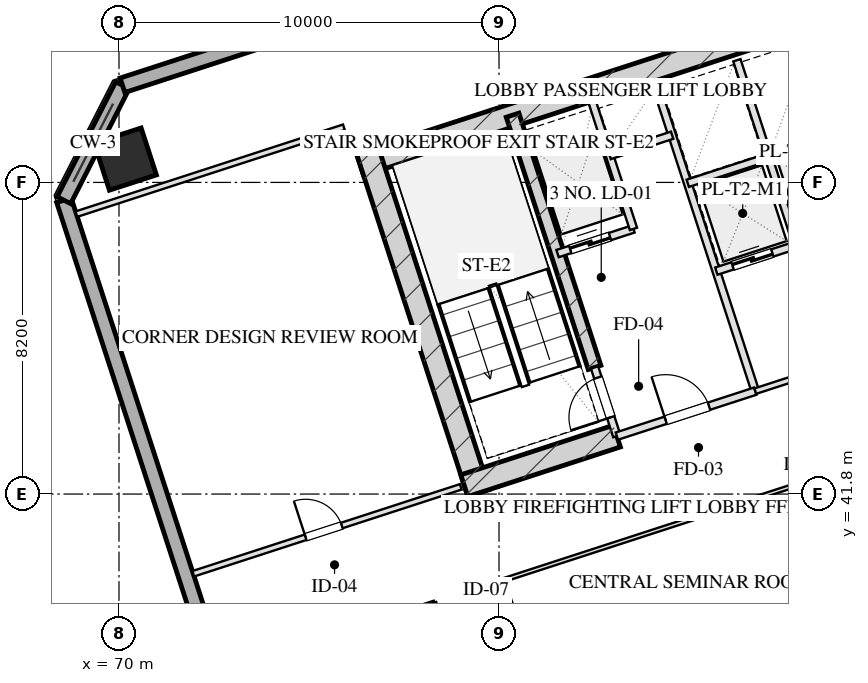
"""IFC4 building model, lengths in metres.
Left out: names, types, materials, properties, quantities, classifications, styles, units other than length and angle.
Written with IfcOpenShell. Run it as: python <this file> out.ifc"""

import sys

from ifc_helpers import new_model, si_unit, direction, frame, frame_2d, origin, origin_2d, place, context, subcontext, project, spatial, rectangle, hollow_rectangle, extrude, element, fill, save


model = new_model("IFC4")
c1 = context("Model", 3, precision=1e-05, world=origin(), true_north=direction((0.0, 1.0)))
c2 = subcontext(c1, "Body", "Model", "MODEL_VIEW")
j1 = project(units=[si_unit("LENGTHUNIT", "METRE"), si_unit("PLANEANGLEUNIT", "RADIAN")], contexts=[c1])
p1 = place(None, origin())
s1 = spatial("IfcSite", under=j1, at=p1, CompositionType="ELEMENT")
p2 = place(p1, origin())
s2 = spatial("IfcBuilding", under=s1, at=p2, CompositionType="ELEMENT")
p3 = place(p2, frame((0.0, 0.0, 146.05)))
s3 = spatial("IfcBuildingStorey", under=s2, at=p3, CompositionType="ELEMENT", Elevation=146.05)
p4 = place(p3, frame((76.344, 50.466, 0.0), z_axis=(0.0, 0.0, 1.0), x_axis=(0.951055727519, 0.309019421968, 0.0)))
e1 = element("IfcWall", 1, at=p4, inside=s3, PredefinedType="SHEAR", context=c2, shape_type="SweptSolid", body=[
    extrude(rectangle(XDim=16.4, YDim=0.6, at=frame_2d((8.2, 0.0))), origin(), (0.0, 0.0, 1.0), 3.45),
])
p5 = place(p3, frame((79.466, 41.828, 0.0), z_axis=(0.0, 0.0, 1.0), x_axis=(-0.309041232772, 0.951048640421, 0.0)))
e2 = element("IfcWall", 2, at=p5, inside=s3, PredefinedType="SHEAR", context=c2, shape_type="SweptSolid", body=[
    extrude(rectangle(XDim=9.48, YDim=0.6, at=frame_2d((4.74, 0.0))), origin(), (0.0, 0.0, 1.0), 3.45),
])
p6 = place(p3, frame((82.514, 45.131, 0.0), z_axis=(0.0, 0.0, 1.0), x_axis=(-0.308988790936, 0.951065679686, 0.0)))
e3 = element("IfcWall", 3, at=p6, inside=s3, PredefinedType="SHEAR", context=c2, shape_type="SweptSolid", body=[
    extrude(rectangle(XDim=6.98, YDim=0.35, at=frame_2d((3.49, 0.0))), origin(), (0.0, 0.0, 1.0), 3.45),
])
p7 = place(p3, frame((79.087, 42.021, 0.0), z_axis=(0.0, 0.0, 1.0), x_axis=(0.951062550203, 0.3089984233, 0.0)))
e4 = element("IfcWall", 4, at=p7, inside=s3, PredefinedType="SHEAR", context=c2, shape_type="SweptSolid", body=[
    extrude(rectangle(XDim=4.22, YDim=0.6, at=frame_2d((2.11, 0.0))), origin(), (0.0, 0.0, 1.0), 3.45),
])
p8 = place(p3, frame((70.165, 50.614, 0.0), z_axis=(0.0, 0.0, 1.0), x_axis=(0.951056516295, 0.309016994375, 0.0)))
e5 = element("IfcColumn", 5, at=p8, inside=s3, PredefinedType="COLUMN", context=c2, shape_type="SweptSolid", body=[
    extrude(hollow_rectangle(XDim=1.3, YDim=1.3, WallThickness=0.045, at=origin_2d()), origin(), (0.0, 0.0, 1.0), 3.451),
])
p9 = place(p3, frame((81.776, 8.827, 0.0), z_axis=(0.0, 0.0, 1.0), x_axis=(-0.309014228706, 0.951057414911, 0.0)))
e6 = element("IfcWall", 6, at=p9, inside=s3, PredefinedType="SOLIDWALL", context=c2, shape_type="SweptSolid", body=[
    extrude(rectangle(XDim=42.8, YDim=0.4, at=frame_2d((21.4, 0.0))), origin(), (0.0, 0.0, 1.0), 2.61),
])
p10 = place(p9, frame((17.733, 0.0, 0.0)))
e7 = element("IfcOpeningElement", 7, at=p10, cuts=e6, PredefinedType="OPENING", context=c2, shape_type="SweptSolid", body=[
    extrude(rectangle(XDim=1.1, YDim=2.15, at=frame_2d((0.55, 1.075))), frame((0.0, 0.21, 0.0), z_axis=(0.0, -1.0, 0.0), x_axis=(1.0, 0.0, 0.0)), (0.0, 0.0, 1.0), 0.42),
])
p11 = place(p3, frame((68.551, 49.532, 0.0), z_axis=(0.0, 0.0, 1.0), x_axis=(0.454019523198, 0.890991735402, 0.0)))
e8 = element("IfcWall", 8, at=p11, inside=s3, PredefinedType="SOLIDWALL", context=c2, shape_type="SweptSolid", body=[
    extrude(rectangle(XDim=3.394, YDim=0.4, at=frame_2d((1.697, 0.0))), origin(), (0.0, 0.0, 1.0), 2.61),
])
p12 = place(p3, frame((70.092, 52.556, 0.0), z_axis=(0.0, 0.0, 1.0), x_axis=(0.951057580055, 0.30901372044, 0.0)))
e9 = element("IfcWall", 9, at=p12, inside=s3, PredefinedType="SOLIDWALL", context=c2, shape_type="SweptSolid", body=[
    extrude(rectangle(XDim=26.4, YDim=0.4, at=frame_2d((13.2, 0.0))), origin(), (0.0, 0.0, 1.0), 2.61),
])
p13 = place(p3, frame((83.101, 43.324, 0.0), z_axis=(0.0, 0.0, 1.0), x_axis=(-0.309048298632, 0.951046344356, 0.0)))
e10 = element("IfcWall", 10, at=p13, inside=s3, PredefinedType="PARTITIONING", context=c2, shape_type="SweptSolid", body=[
    extrude(rectangle(XDim=1.9, YDim=0.2, at=frame_2d((0.95, 0.0))), origin(), (0.0, 0.0, 1.0), 3.175),
])
p14 = place(p13, frame((0.52, 0.0, 0.0)))
e11 = element("IfcOpeningElement", 11, at=p14, cuts=e10, PredefinedType="OPENING", context=c2, shape_type="SweptSolid", body=[
    extrude(rectangle(XDim=1.1, YDim=2.05, at=frame_2d((0.55, 1.025))), frame((0.0, 0.11, 0.0), z_axis=(0.0, -1.0, 0.0), x_axis=(1.0, 0.0, 0.0)), (0.0, 0.0, 1.0), 0.22),
])
p15 = place(p3, frame((86.743, 44.508, 0.0), z_axis=(0.0, 0.0, 1.0), x_axis=(-0.309016001439, 0.951056838919, 0.0)))
e12 = element("IfcWall", 12, at=p15, inside=s3, PredefinedType="PARTITIONING", context=c2, shape_type="SweptSolid", body=[
    extrude(rectangle(XDim=8.43, YDim=0.2, at=frame_2d((4.215, 0.0))), origin(), (0.0, 0.0, 1.0), 3.175),
])
p16 = place(p3, frame((83.101, 43.324, 0.0), z_axis=(0.0, 0.0, 1.0), x_axis=(0.951052804469, 0.309028417967, 0.0)))
e13 = element("IfcWall", 13, at=p16, inside=s3, PredefinedType="PARTITIONING", context=c2, shape_type="SweptSolid", body=[
    extrude(rectangle(XDim=3.83, YDim=0.2, at=frame_2d((1.915, 0.0))), origin(), (0.0, 0.0, 1.0), 3.175),
])
p17 = place(p16, frame((1.35, 0.0, 0.0)))
e14 = element("IfcOpeningElement", 14, at=p17, cuts=e13, PredefinedType="OPENING", context=c2, shape_type="SweptSolid", body=[
    extrude(rectangle(XDim=1.2, YDim=2.05, at=frame_2d((0.6, 1.025))), frame((0.0, 0.11, 0.0), z_axis=(0.0, -1.0, 0.0), x_axis=(1.0, 0.0, 0.0)), (0.0, 0.0, 1.0), 0.22),
])
p18 = place(p3, frame((81.54, 48.127, 0.0), z_axis=(0.0, 0.0, 1.0), x_axis=(0.951062257173, 0.308999325213, 0.0)))
e15 = element("IfcWall", 15, at=p18, inside=s3, PredefinedType="PARTITIONING", context=c2, shape_type="SweptSolid", body=[
    extrude(rectangle(XDim=2.1, YDim=0.2, at=frame_2d((1.05, 0.0))), origin(), (0.0, 0.0, 1.0), 3.175),
])
p19 = place(p18, frame((0.35, 0.0, 0.0)))
e16 = element("IfcOpeningElement", 16, at=p19, cuts=e15, PredefinedType="OPENING", context=c2, shape_type="SweptSolid", body=[
    extrude(rectangle(XDim=1.1, YDim=2.05, at=frame_2d((0.55, 1.025))), frame((0.0, 0.11, 0.0), z_axis=(0.0, -1.0, 0.0), x_axis=(1.0, 0.0, 0.0)), (0.0, 0.0, 1.0), 0.22),
])
p20 = place(p3, frame((83.538, 48.776, 0.0), z_axis=(0.0, 0.0, 1.0), x_axis=(-0.3089935693, 0.951064127245, 0.0)))
e17 = element("IfcWall", 17, at=p20, inside=s3, PredefinedType="PARTITIONING", context=c2, shape_type="SweptSolid", body=[
    extrude(rectangle(XDim=3.7, YDim=0.2, at=frame_2d((1.85, 0.0))), origin(), (0.0, 0.0, 1.0), 3.175),
])
p21 = place(p3, frame((82.91, 50.707, 0.0), z_axis=(0.0, 0.0, 1.0), x_axis=(0.951041328149, 0.309063734775, 0.0)))
e18 = element("IfcWall", 18, at=p21, inside=s3, PredefinedType="PARTITIONING", context=c2, shape_type="SweptSolid", body=[
    extrude(rectangle(XDim=1.73, YDim=0.2, at=frame_2d((0.865, 0.0))), origin(), (0.0, 0.0, 1.0), 3.175),
])
p22 = place(p3, frame((86.743, 44.508, 0.0), z_axis=(0.0, 0.0, 1.0), x_axis=(0.951063829732, 0.308994485023, 0.0)))
e19 = element("IfcWall", 19, at=p22, inside=s3, PredefinedType="PARTITIONING", context=c2, shape_type="SweptSolid", body=[
    extrude(rectangle(XDim=4.4, YDim=0.15, at=frame_2d((2.2, 0.0))), origin(), (0.0, 0.0, 1.0), 3.175),
])
p23 = place(p22, frame((1.45, 0.0, 0.0)))
e20 = element("IfcOpeningElement", 20, at=p23, cuts=e19, PredefinedType="OPENING", context=c2, shape_type="SweptSolid", body=[
    extrude(rectangle(XDim=1.5, YDim=2.05, at=frame_2d((0.75, 1.025))), frame((0.0, 0.085, 0.0), z_axis=(0.0, -1.0, 0.0), x_axis=(1.0, 0.0, 0.0)), (0.0, 0.0, 1.0), 0.17),
])
p24 = place(p3, frame((85.718, 47.666, 0.0), z_axis=(0.0, 0.0, 1.0), x_axis=(0.951058531764, 0.30901079133, 0.0)))
e21 = element("IfcWall", 21, at=p24, inside=s3, PredefinedType="PARTITIONING", context=c2, shape_type="SweptSolid", body=[
    extrude(rectangle(XDim=4.4, YDim=0.2, at=frame_2d((2.2, 0.0))), origin(), (0.0, 0.0, 1.0), 3.175),
])
p25 = place(p24, frame((0.45, 0.0, 0.0)))
e22 = element("IfcOpeningElement", 22, at=p25, cuts=e21, PredefinedType="OPENING", context=c2, shape_type="SweptSolid", body=[
    extrude(rectangle(XDim=1.1, YDim=2.05, at=frame_2d((0.55, 1.025))), frame((0.0, 0.11, 0.0), z_axis=(0.0, -1.0, 0.0), x_axis=(1.0, 0.0, 0.0)), (0.0, 0.0, 1.0), 0.22),
])
p26 = place(p24, frame((2.55, 0.0, 0.0)))
e23 = element("IfcOpeningElement", 23, at=p26, cuts=e21, PredefinedType="OPENING", context=c2, shape_type="SweptSolid", body=[
    extrude(rectangle(XDim=1.1, YDim=2.05, at=frame_2d((0.55, 1.025))), frame((0.0, 0.11, 0.0), z_axis=(0.0, -1.0, 0.0), x_axis=(1.0, 0.0, 0.0)), (0.0, 0.0, 1.0), 0.22),
])
p27 = place(p3, frame((87.838, 48.354, 0.0), z_axis=(0.0, 0.0, 1.0), x_axis=(-0.3090093719, 0.951058992953, 0.0)))
e24 = element("IfcWall", 24, at=p27, inside=s3, PredefinedType="PARTITIONING", context=c2, shape_type="SweptSolid", body=[
    extrude(rectangle(XDim=5.11, YDim=0.2, at=frame_2d((2.555, 0.0))), origin(), (0.0, 0.0, 1.0), 3.175),
])
p28 = place(p3, frame((84.967, 49.977, 0.0), z_axis=(0.0, 0.0, 1.0), x_axis=(0.951063829732, 0.308994485023, 0.0)))
e25 = element("IfcWall", 25, at=p28, inside=s3, PredefinedType="PARTITIONING", context=c2, shape_type="SweptSolid", body=[
    extrude(rectangle(XDim=4.4, YDim=0.2, at=frame_2d((2.2, 0.0))), origin(), (0.0, 0.0, 1.0), 3.175),
])
p29 = place(p3, frame((68.88, 49.166, 0.0), z_axis=(0.0, 0.0, 1.0), x_axis=(0.951060977215, 0.309003264738, 0.0)))
e26 = element("IfcWall", 26, at=p29, inside=s3, PredefinedType="PARTITIONING", context=c2, shape_type="SweptSolid", body=[
    extrude(rectangle(XDim=7.4, YDim=0.15, at=frame_2d((3.7, 0.0))), origin(), (0.0, 0.0, 1.0), 3.175),
])
p30 = place(p3, frame((71.955, 39.703, 0.0), z_axis=(0.0, 0.0, 1.0), x_axis=(0.951060977215, 0.309003264738, 0.0)))
e27 = element("IfcWall", 27, at=p30, inside=s3, PredefinedType="PARTITIONING", context=c2, shape_type="SweptSolid", body=[
    extrude(rectangle(XDim=7.4, YDim=0.15, at=frame_2d((3.7, 0.0))), origin(), (0.0, 0.0, 1.0), 3.175),
])
p31 = place(p30, frame((3.108, 0.0, 0.0)))
e28 = element("IfcOpeningElement", 28, at=p31, cuts=e27, PredefinedType="OPENING", context=c2, shape_type="SweptSolid", body=[
    extrude(rectangle(XDim=1.0, YDim=2.05, at=frame_2d((0.5, 1.025))), frame((0.0, 0.085, 0.0), z_axis=(0.0, -1.0, 0.0), x_axis=(1.0, 0.0, 0.0)), (0.0, 0.0, 1.0), 0.17),
])
p32 = place(p3, frame((72.783, 37.154, 0.0), z_axis=(0.0, 0.0, 1.0), x_axis=(0.951047059821, 0.309046096893, 0.0)))
e29 = element("IfcWall", 29, at=p32, inside=s3, PredefinedType="MOVABLE", context=c2, shape_type="SweptSolid", body=[
    extrude(rectangle(XDim=5.8, YDim=0.1, at=frame_2d((2.9, 0.0))), origin(), (0.0, 0.0, 1.0), 3.175),
])
p33 = place(p3, frame((80.106, 39.533, 0.0), z_axis=(0.0, 0.0, 1.0), x_axis=(0.951059123431, 0.309008970321, 0.0)))
e30 = element("IfcWall", 30, at=p33, inside=s3, PredefinedType="MOVABLE", context=c2, shape_type="SweptSolid", body=[
    extrude(rectangle(XDim=8.95, YDim=0.1, at=frame_2d((4.475, 0.0))), origin(), (0.0, 0.0, 1.0), 3.175),
])
p34 = place(p3, frame((83.441, 23.121, 0.0), z_axis=(0.0, 0.0, 1.0), x_axis=(-0.30901773025, 0.951056277195, 0.0)))
e31 = element("IfcWall", 31, at=p34, inside=s3, PredefinedType="MOVABLE", context=c2, shape_type="SweptSolid", body=[
    extrude(rectangle(XDim=16.64, YDim=0.1, at=frame_2d((8.32, 0.0))), origin(), (0.0, 0.0, 1.0), 3.175),
])
p35 = place(p34, frame((1.143, 0.0, 0.0)))
e32 = element("IfcOpeningElement", 32, at=p35, cuts=e31, PredefinedType="OPENING", context=c2, shape_type="SweptSolid", body=[
    extrude(rectangle(XDim=1.0, YDim=2.05, at=frame_2d((0.5, 1.025))), frame((0.0, 0.06, 0.0), z_axis=(0.0, -1.0, 0.0), x_axis=(1.0, 0.0, 0.0)), (0.0, 0.0, 1.0), 0.12),
])
p36 = place(p34, frame((4.703, 0.0, 0.0)))
e33 = element("IfcOpeningElement", 33, at=p36, cuts=e31, PredefinedType="OPENING", context=c2, shape_type="SweptSolid", body=[
    extrude(rectangle(XDim=1.0, YDim=2.05, at=frame_2d((0.5, 1.025))), frame((0.0, 0.06, 0.0), z_axis=(0.0, -1.0, 0.0), x_axis=(1.0, 0.0, 0.0)), (0.0, 0.0, 1.0), 0.12),
])
p37 = place(p34, frame((7.82, 0.0, 0.0)))
e34 = element("IfcOpeningElement", 34, at=p37, cuts=e31, PredefinedType="OPENING", context=c2, shape_type="SweptSolid", body=[
    extrude(rectangle(XDim=1.0, YDim=2.05, at=frame_2d((0.5, 1.025))), frame((0.0, 0.06, 0.0), z_axis=(0.0, -1.0, 0.0), x_axis=(1.0, 0.0, 0.0)), (0.0, 0.0, 1.0), 0.12),
])
p38 = place(p34, frame((10.92, 0.0, 0.0)))
e35 = element("IfcOpeningElement", 35, at=p38, cuts=e31, PredefinedType="OPENING", context=c2, shape_type="SweptSolid", body=[
    extrude(rectangle(XDim=1.0, YDim=2.05, at=frame_2d((0.5, 1.025))), frame((0.0, 0.06, 0.0), z_axis=(0.0, -1.0, 0.0), x_axis=(1.0, 0.0, 0.0)), (0.0, 0.0, 1.0), 0.12),
])
p39 = place(p34, frame((14.48, 0.0, 0.0)))
e36 = element("IfcOpeningElement", 36, at=p39, cuts=e31, PredefinedType="OPENING", context=c2, shape_type="SweptSolid", body=[
    extrude(rectangle(XDim=1.05, YDim=2.05, at=frame_2d((0.525, 1.025))), frame((0.0, 0.06, 0.0), z_axis=(0.0, -1.0, 0.0), x_axis=(1.0, 0.0, 0.0)), (0.0, 0.0, 1.0), 0.12),
])
p40 = place(p3, frame((85.248, 23.708, 0.0), z_axis=(0.0, 0.0, 1.0), x_axis=(-0.309004459387, 0.951060589068, 0.0)))
e37 = element("IfcWall", 37, at=p40, inside=s3, PredefinedType="MOVABLE", context=c2, shape_type="SweptSolid", body=[
    extrude(rectangle(XDim=16.64, YDim=0.1, at=frame_2d((8.32, 0.0))), origin(), (0.0, 0.0, 1.0), 3.175),
])
p41 = place(p40, frame((1.944, 0.0, 0.0)))
e38 = element("IfcOpeningElement", 38, at=p41, cuts=e37, PredefinedType="OPENING", context=c2, shape_type="SweptSolid", body=[
    extrude(rectangle(XDim=1.1, YDim=2.05, at=frame_2d((0.55, 1.025))), frame((0.0, 0.06, 0.0), z_axis=(0.0, -1.0, 0.0), x_axis=(1.0, 0.0, 0.0)), (0.0, 0.0, 1.0), 0.12),
])
p42 = place(p40, frame((14.264, 0.0, 0.0)))
e39 = element("IfcOpeningElement", 39, at=p42, cuts=e37, PredefinedType="OPENING", context=c2, shape_type="SweptSolid", body=[
    extrude(rectangle(XDim=1.1, YDim=2.05, at=frame_2d((0.55, 1.025))), frame((0.0, 0.06, 0.0), z_axis=(0.0, -1.0, 0.0), x_axis=(1.0, 0.0, 0.0)), (0.0, 0.0, 1.0), 0.12),
])
p43 = place(p14, origin())
e40 = element("IfcDoor", 40, at=p43, inside=s3, OperationType="SINGLE_SWING_LEFT", PredefinedType="DOOR", context=c2, shape_type="SweptSolid", body=[
    extrude(rectangle(XDim=1.1, YDim=2.05, at=frame_2d((0.55, 1.025))), frame((0.0, 0.025, 0.0), z_axis=(0.0, -1.0, 0.0), x_axis=(1.0, 0.0, 0.0)), (0.0, 0.0, 1.0), 0.05),
])
fill(e11, e40)
p44 = place(p17, origin())
e41 = element("IfcDoor", 41, at=p44, inside=s3, OperationType="SINGLE_SWING_LEFT", PredefinedType="DOOR", context=c2, shape_type="SweptSolid", body=[
    extrude(rectangle(XDim=1.2, YDim=2.05, at=frame_2d((0.6, 1.025))), frame((0.0, 0.025, 0.0), z_axis=(0.0, -1.0, 0.0), x_axis=(1.0, 0.0, 0.0)), (0.0, 0.0, 1.0), 0.05),
])
fill(e14, e41)
p45 = place(p19, origin())
e42 = element("IfcDoor", 42, at=p45, inside=s3, OperationType="DOUBLE_DOOR_SLIDING", PredefinedType="DOOR", context=c2, shape_type="SweptSolid", body=[
    extrude(rectangle(XDim=1.1, YDim=2.05, at=frame_2d((0.55, 1.025))), frame((0.0, 0.025, 0.0), z_axis=(0.0, -1.0, 0.0), x_axis=(1.0, 0.0, 0.0)), (0.0, 0.0, 1.0), 0.05),
])
fill(e16, e42)
p46 = place(p25, origin())
e43 = element("IfcDoor", 43, at=p46, inside=s3, OperationType="DOUBLE_DOOR_SLIDING", PredefinedType="DOOR", context=c2, shape_type="SweptSolid", body=[
    extrude(rectangle(XDim=1.1, YDim=2.05, at=frame_2d((0.55, 1.025))), frame((0.0, 0.025, 0.0), z_axis=(0.0, -1.0, 0.0), x_axis=(1.0, 0.0, 0.0)), (0.0, 0.0, 1.0), 0.05),
])
fill(e22, e43)
p47 = place(p31, origin())
e44 = element("IfcDoor", 44, at=p47, inside=s3, OperationType="SINGLE_SWING_LEFT", PredefinedType="DOOR", context=c2, shape_type="SweptSolid", body=[
    extrude(rectangle(XDim=1.0, YDim=2.05, at=frame_2d((0.5, 1.025))), frame((0.0, 0.025, 0.0), z_axis=(0.0, -1.0, 0.0), x_axis=(1.0, 0.0, 0.0)), (0.0, 0.0, 1.0), 0.05),
])
fill(e28, e44)
save(model, sys.argv[1])
